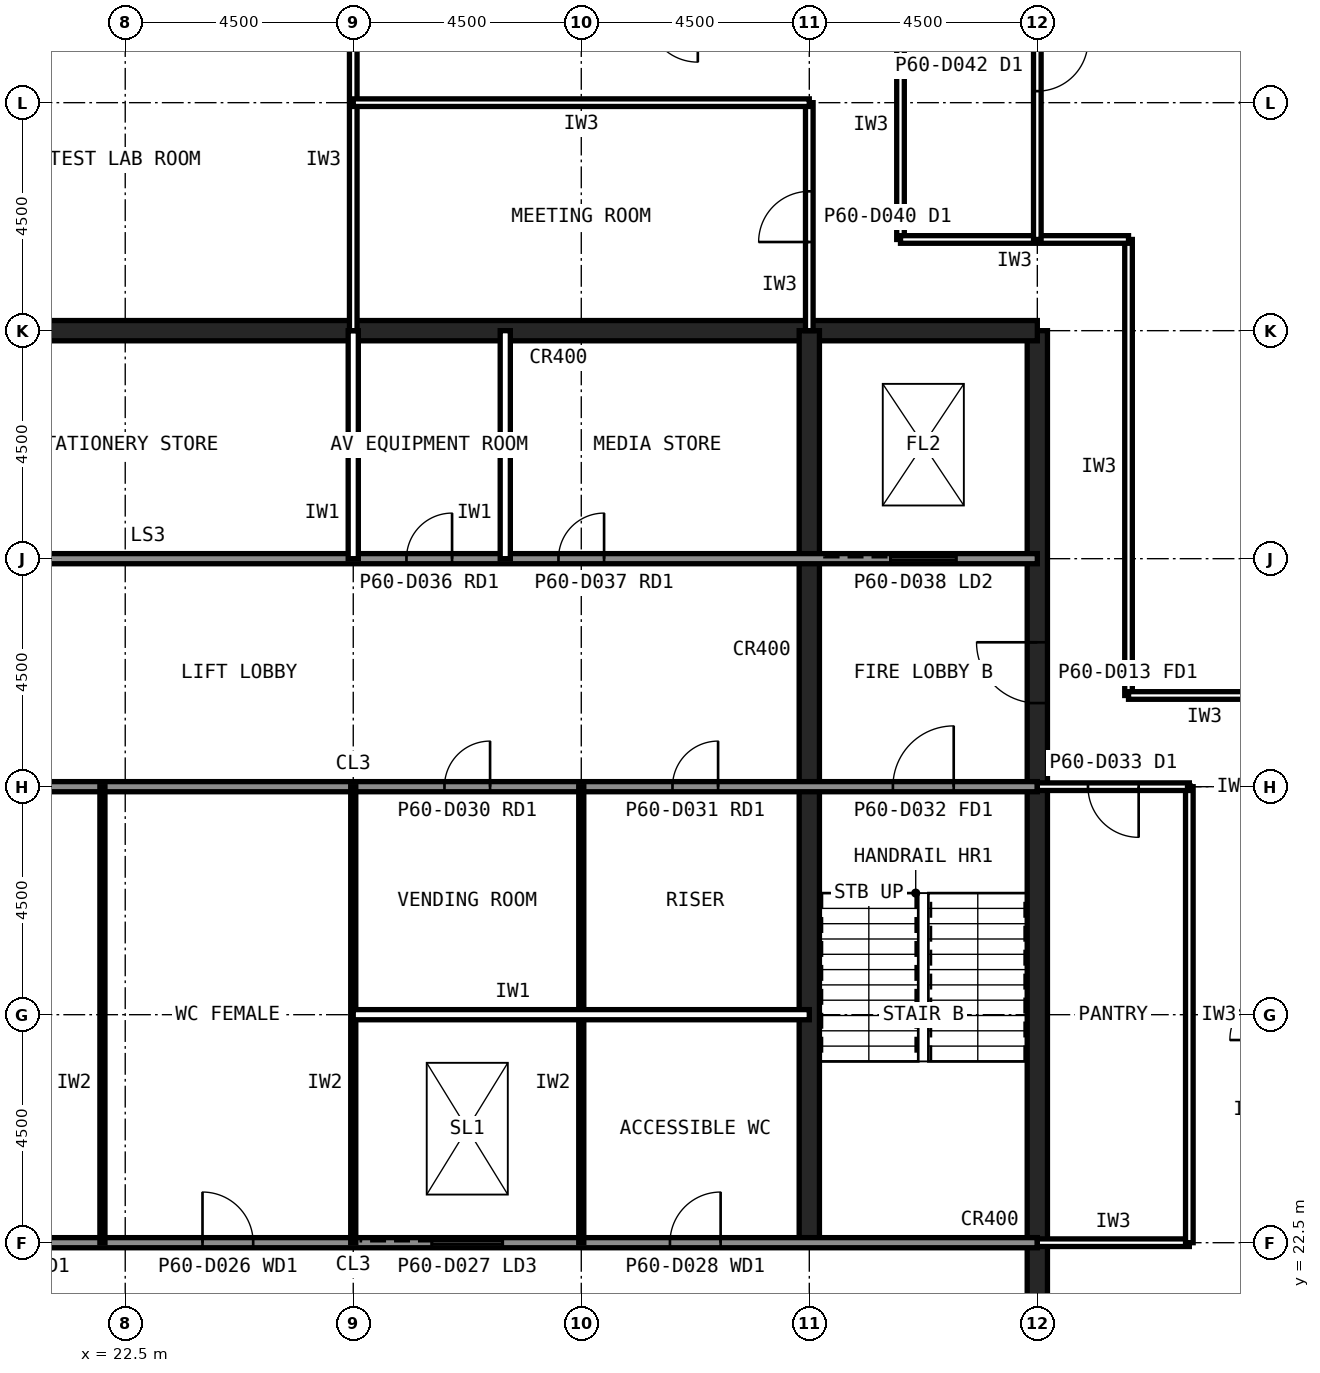
"""IFC4 building model, lengths in metres.
Left out: names, types, materials, properties, quantities, classifications, styles, units other than length and angle.
Written with IfcOpenShell. Run it as: python <this file> out.ifc"""

import sys

from ifc_helpers import new_model, si_unit, direction, frame, frame_2d, origin, place, context, subcontext, project, spatial, rectangle, extrude, element, fill, save


model = new_model("IFC4")
c1 = context("Model", 3, precision=1e-05, world=origin(), true_north=direction((0.0, 1.0)))
c2 = subcontext(c1, "Body", "Model", "MODEL_VIEW")
j1 = project(units=[si_unit("LENGTHUNIT", "METRE"), si_unit("PLANEANGLEUNIT", "RADIAN")], contexts=[c1])
p1 = place(None, origin())
s1 = spatial("IfcSite", under=j1, at=p1, CompositionType="ELEMENT")
p2 = place(p1, origin())
s2 = spatial("IfcBuilding", under=s1, at=p2, CompositionType="ELEMENT")
p3 = place(p2, frame((0.0, 0.0, 254.6)))
s3 = spatial("IfcBuildingStorey", under=s2, at=p3, CompositionType="ELEMENT", Elevation=254.6)
p4 = place(p3, frame((40.5, 13.5, 0.0), z_axis=(0.0, 0.0, 1.0), x_axis=(0.0, 1.0, 0.0)))
e1 = element("IfcWall", 1, at=p4, inside=s3, PredefinedType="SHEAR", context=c2, shape_type="SweptSolid", body=[
    extrude(rectangle(XDim=27.0, YDim=0.4, at=frame_2d((13.5, 0.0))), origin(), (0.0, 0.0, 1.0), 4.0),
])
p5 = place(p4, frame((5.85, 0.0, 0.0)))
e2 = element("IfcOpeningElement", 2, at=p5, cuts=e1, PredefinedType="OPENING", context=c2, shape_type="SweptSolid", body=[
    extrude(rectangle(XDim=1.8, YDim=2.1, at=frame_2d((0.9, 1.05))), frame((0.0, 0.21, 0.0), z_axis=(0.0, -1.0, 0.0), x_axis=(1.0, 0.0, 0.0)), (0.0, 0.0, 1.0), 0.42),
])
p6 = place(p4, frame((19.65, 0.0, 0.0)))
e3 = element("IfcOpeningElement", 3, at=p6, cuts=e1, PredefinedType="OPENING", context=c2, shape_type="SweptSolid", body=[
    extrude(rectangle(XDim=1.2, YDim=2.1, at=frame_2d((0.6, 1.05))), frame((0.0, 0.21, 0.0), z_axis=(0.0, -1.0, 0.0), x_axis=(1.0, 0.0, 0.0)), (0.0, 0.0, 1.0), 0.42),
])
p7 = place(p3, frame((40.5, 40.5, 0.0), z_axis=(0.0, 0.0, 1.0), x_axis=(-1.0, 0.0, 0.0)))
e4 = element("IfcWall", 4, at=p7, inside=s3, PredefinedType="SHEAR", context=c2, shape_type="SweptSolid", body=[
    extrude(rectangle(XDim=27.0, YDim=0.4, at=frame_2d((13.5, 0.0))), origin(), (0.0, 0.0, 1.0), 4.0),
])
p8 = place(p3, frame((36.0, 22.5, 0.0), z_axis=(0.0, 0.0, 1.0), x_axis=(0.0, 1.0, 0.0)))
e5 = element("IfcWall", 5, at=p8, inside=s3, PredefinedType="SHEAR", context=c2, shape_type="SweptSolid", body=[
    extrude(rectangle(XDim=18.0, YDim=0.4, at=frame_2d((9.0, 0.0))), origin(), (0.0, 0.0, 1.0), 4.0),
])
p9 = place(p3, frame((13.5, 36.0, 0.0), z_axis=(0.0, 0.0, 1.0), x_axis=(1.0, 0.0, 0.0)))
e6 = element("IfcWall", 6, at=p9, inside=s3, PredefinedType="SOLIDWALL", context=c2, shape_type="SweptSolid", body=[
    extrude(rectangle(XDim=27.0, YDim=0.2, at=frame_2d((13.5, 0.0))), origin(), (0.0, 0.0, 1.0), 3.84),
])
p10 = place(p9, frame((1.8, 0.0, 0.0)))
e7 = element("IfcOpeningElement", 7, at=p10, cuts=e6, PredefinedType="OPENING", context=c2, shape_type="SweptSolid", body=[
    extrude(rectangle(XDim=0.9, YDim=2.1, at=frame_2d((0.45, 1.05))), frame((0.0, 0.11, 0.0), z_axis=(0.0, -1.0, 0.0), x_axis=(1.0, 0.0, 0.0)), (0.0, 0.0, 1.0), 0.22),
])
p11 = place(p9, frame((5.55, 0.0, 0.0)))
e8 = element("IfcOpeningElement", 8, at=p11, cuts=e6, PredefinedType="OPENING", context=c2, shape_type="SweptSolid", body=[
    extrude(rectangle(XDim=0.9, YDim=2.1, at=frame_2d((0.45, 1.05))), frame((0.0, 0.11, 0.0), z_axis=(0.0, -1.0, 0.0), x_axis=(1.0, 0.0, 0.0)), (0.0, 0.0, 1.0), 0.22),
])
p12 = place(p9, frame((14.55, 0.0, 0.0)))
e9 = element("IfcOpeningElement", 9, at=p12, cuts=e6, PredefinedType="OPENING", context=c2, shape_type="SweptSolid", body=[
    extrude(rectangle(XDim=0.9, YDim=2.1, at=frame_2d((0.45, 1.05))), frame((0.0, 0.11, 0.0), z_axis=(0.0, -1.0, 0.0), x_axis=(1.0, 0.0, 0.0)), (0.0, 0.0, 1.0), 0.22),
])
p13 = place(p9, frame((17.55, 0.0, 0.0)))
e10 = element("IfcOpeningElement", 10, at=p13, cuts=e6, PredefinedType="OPENING", context=c2, shape_type="SweptSolid", body=[
    extrude(rectangle(XDim=0.9, YDim=2.1, at=frame_2d((0.45, 1.05))), frame((0.0, 0.11, 0.0), z_axis=(0.0, -1.0, 0.0), x_axis=(1.0, 0.0, 0.0)), (0.0, 0.0, 1.0), 0.22),
])
p14 = place(p9, frame((24.1, 0.0, 0.0)))
e11 = element("IfcOpeningElement", 11, at=p14, cuts=e6, PredefinedType="OPENING", context=c2, shape_type="SweptSolid", body=[
    extrude(rectangle(XDim=1.3, YDim=2.2, at=frame_2d((0.65, 1.1))), frame((0.0, 0.11, 0.0), z_axis=(0.0, -1.0, 0.0), x_axis=(1.0, 0.0, 0.0)), (0.0, 0.0, 1.0), 0.22),
])
p15 = place(p3, frame((13.5, 22.5, 0.0), z_axis=(0.0, 0.0, 1.0), x_axis=(1.0, 0.0, 0.0)))
e12 = element("IfcWall", 12, at=p15, inside=s3, PredefinedType="SOLIDWALL", context=c2, shape_type="SweptSolid", body=[
    extrude(rectangle(XDim=27.0, YDim=0.2, at=frame_2d((13.5, 0.0))), origin(), (0.0, 0.0, 1.0), 3.84),
])
p16 = place(p15, frame((1.65, 0.0, 0.0)))
e13 = element("IfcOpeningElement", 13, at=p16, cuts=e12, PredefinedType="OPENING", context=c2, shape_type="SweptSolid", body=[
    extrude(rectangle(XDim=1.2, YDim=2.1, at=frame_2d((0.6, 1.05))), frame((0.0, 0.11, 0.0), z_axis=(0.0, -1.0, 0.0), x_axis=(1.0, 0.0, 0.0)), (0.0, 0.0, 1.0), 0.22),
])
p17 = place(p15, frame((6.025, 0.0, 0.0)))
e14 = element("IfcOpeningElement", 14, at=p17, cuts=e12, PredefinedType="OPENING", context=c2, shape_type="SweptSolid", body=[
    extrude(rectangle(XDim=1.0, YDim=2.1, at=frame_2d((0.5, 1.05))), frame((0.0, 0.11, 0.0), z_axis=(0.0, -1.0, 0.0), x_axis=(1.0, 0.0, 0.0)), (0.0, 0.0, 1.0), 0.22),
])
p18 = place(p15, frame((10.525, 0.0, 0.0)))
e15 = element("IfcOpeningElement", 15, at=p18, cuts=e12, PredefinedType="OPENING", context=c2, shape_type="SweptSolid", body=[
    extrude(rectangle(XDim=1.0, YDim=2.1, at=frame_2d((0.5, 1.05))), frame((0.0, 0.11, 0.0), z_axis=(0.0, -1.0, 0.0), x_axis=(1.0, 0.0, 0.0)), (0.0, 0.0, 1.0), 0.22),
])
p19 = place(p15, frame((19.75, 0.0, 0.0)))
e16 = element("IfcOpeningElement", 16, at=p19, cuts=e12, PredefinedType="OPENING", context=c2, shape_type="SweptSolid", body=[
    extrude(rectangle(XDim=1.0, YDim=2.1, at=frame_2d((0.5, 1.05))), frame((0.0, 0.11, 0.0), z_axis=(0.0, -1.0, 0.0), x_axis=(1.0, 0.0, 0.0)), (0.0, 0.0, 1.0), 0.22),
])
p20 = place(p15, frame((15.05, 0.0, 0.0)))
e17 = element("IfcOpeningElement", 17, at=p20, cuts=e12, PredefinedType="OPENING", context=c2, shape_type="SweptSolid", body=[
    extrude(rectangle(XDim=1.4, YDim=2.4, at=frame_2d((0.7, 1.2))), frame((0.0, 0.11, 0.0), z_axis=(0.0, -1.0, 0.0), x_axis=(1.0, 0.0, 0.0)), (0.0, 0.0, 1.0), 0.22),
])
p21 = place(p3, frame((13.5, 31.5, 0.0), z_axis=(0.0, 0.0, 1.0), x_axis=(1.0, 0.0, 0.0)))
e18 = element("IfcWall", 18, at=p21, inside=s3, PredefinedType="SOLIDWALL", context=c2, shape_type="SweptSolid", body=[
    extrude(rectangle(XDim=27.0, YDim=0.2, at=frame_2d((13.5, 0.0))), origin(), (0.0, 0.0, 1.0), 3.84),
])
p22 = place(p21, frame((24.15, 0.0, 0.0)))
e19 = element("IfcOpeningElement", 19, at=p22, cuts=e18, PredefinedType="OPENING", context=c2, shape_type="SweptSolid", body=[
    extrude(rectangle(XDim=1.2, YDim=2.1, at=frame_2d((0.6, 1.05))), frame((0.0, 0.11, 0.0), z_axis=(0.0, -1.0, 0.0), x_axis=(1.0, 0.0, 0.0)), (0.0, 0.0, 1.0), 0.22),
])
p23 = place(p21, frame((15.3, 0.0, 0.0)))
e20 = element("IfcOpeningElement", 20, at=p23, cuts=e18, PredefinedType="OPENING", context=c2, shape_type="SweptSolid", body=[
    extrude(rectangle(XDim=0.9, YDim=2.1, at=frame_2d((0.45, 1.05))), frame((0.0, 0.11, 0.0), z_axis=(0.0, -1.0, 0.0), x_axis=(1.0, 0.0, 0.0)), (0.0, 0.0, 1.0), 0.22),
])
p24 = place(p21, frame((19.8, 0.0, 0.0)))
e21 = element("IfcOpeningElement", 21, at=p24, cuts=e18, PredefinedType="OPENING", context=c2, shape_type="SweptSolid", body=[
    extrude(rectangle(XDim=0.9, YDim=2.1, at=frame_2d((0.45, 1.05))), frame((0.0, 0.11, 0.0), z_axis=(0.0, -1.0, 0.0), x_axis=(1.0, 0.0, 0.0)), (0.0, 0.0, 1.0), 0.22),
])
for number, where, z_axis, x_axis in (
    (22, (27.0, 36.0, 0.0), (0.0, 0.0, 1.0), (0.0, 1.0, 0.0)),
    (23, (30.0, 36.0, 0.0), (0.0, 0.0, 1.0), (0.0, 1.0, 0.0)),
):
    element("IfcWall", number, at=place(p3, frame(where, z_axis=z_axis, x_axis=x_axis)), inside=s3, PredefinedType="PARTITIONING", context=c2, shape_type="SweptSolid", body=[
        extrude(rectangle(XDim=4.5, YDim=0.2, at=frame_2d((2.25, 0.0))), origin(), (0.0, 0.0, 1.0), 3.84),
    ])
for number, where, z_axis, x_axis in (
    (24, (22.05, 22.5, 0.0), (0.0, 0.0, 1.0), (0.0, 1.0, 0.0)),
    (25, (27.0, 22.5, 0.0), (0.0, 0.0, 1.0), (0.0, 1.0, 0.0)),
    (26, (31.5, 22.5, 0.0), (0.0, 0.0, 1.0), (0.0, 1.0, 0.0)),
):
    element("IfcWall", number, at=place(p3, frame(where, z_axis=z_axis, x_axis=x_axis)), inside=s3, PredefinedType="PLUMBINGWALL", context=c2, shape_type="SweptSolid", body=[
        extrude(rectangle(XDim=9.0, YDim=0.1, at=frame_2d((4.5, 0.0))), origin(), (0.0, 0.0, 1.0), 3.84),
    ])
p25 = place(p3, frame((27.0, 27.0, 0.0), z_axis=(0.0, 0.0, 1.0), x_axis=(1.0, 0.0, 0.0)))
e27 = element("IfcWall", 27, at=p25, inside=s3, PredefinedType="PARTITIONING", context=c2, shape_type="SweptSolid", body=[
    extrude(rectangle(XDim=9.0, YDim=0.2, at=frame_2d((4.5, 0.0))), origin(), (0.0, 0.0, 1.0), 3.84),
])
p26 = place(p3, frame((42.3, 33.3, 0.0), z_axis=(0.0, 0.0, 1.0), x_axis=(0.0, 1.0, 0.0)))
e28 = element("IfcWall", 28, at=p26, inside=s3, PredefinedType="PARTITIONING", context=c2, shape_type="SweptSolid", body=[
    extrude(rectangle(XDim=9.0, YDim=0.15, at=frame_2d((4.5, 0.0))), origin(), (0.0, 0.0, 1.0), 3.84),
])
for number, where, z_axis, x_axis in (
    (29, (37.8, 42.3, 0.0), (0.0, 0.0, 1.0), (0.0, 1.0, 0.0)),
    (30, (42.3, 42.3, 0.0), (0.0, 0.0, 1.0), (-1.0, 0.0, 0.0)),
):
    element("IfcWall", number, at=place(p3, frame(where, z_axis=z_axis, x_axis=x_axis)), inside=s3, PredefinedType="PARTITIONING", context=c2, shape_type="SweptSolid", body=[
        extrude(rectangle(XDim=4.5, YDim=0.15, at=frame_2d((2.25, 0.0))), origin(), (0.0, 0.0, 1.0), 3.84),
    ])
p27 = place(p3, frame((45.3, 33.3, 0.0), z_axis=(0.0, 0.0, 1.0), x_axis=(-1.0, 0.0, 0.0)))
e31 = element("IfcWall", 31, at=p27, inside=s3, PredefinedType="PARTITIONING", context=c2, shape_type="SweptSolid", body=[
    extrude(rectangle(XDim=3.0, YDim=0.15, at=frame_2d((1.5, 0.0))), origin(), (0.0, 0.0, 1.0), 3.84),
])
p28 = place(p3, frame((27.0, 40.5, 0.0), z_axis=(0.0, 0.0, 1.0), x_axis=(0.0, 1.0, 0.0)))
e32 = element("IfcWall", 32, at=p28, inside=s3, PredefinedType="PARTITIONING", context=c2, shape_type="SweptSolid", body=[
    extrude(rectangle(XDim=6.75, YDim=0.15, at=frame_2d((3.375, 0.0))), origin(), (0.0, 0.0, 1.0), 2.989),
])
p29 = place(p3, frame((36.0, 40.5, 0.0), z_axis=(0.0, 0.0, 1.0), x_axis=(0.0, 1.0, 0.0)))
e33 = element("IfcWall", 33, at=p29, inside=s3, PredefinedType="PARTITIONING", context=c2, shape_type="SweptSolid", body=[
    extrude(rectangle(XDim=4.5, YDim=0.15, at=frame_2d((2.25, 0.0))), origin(), (0.0, 0.0, 1.0), 2.989),
])
p30 = place(p29, frame((1.75, 0.0, 0.0)))
e34 = element("IfcOpeningElement", 34, at=p30, cuts=e33, PredefinedType="OPENING", context=c2, shape_type="SweptSolid", body=[
    extrude(rectangle(XDim=1.0, YDim=2.1, at=frame_2d((0.5, 1.05))), frame((0.0, 0.085, 0.0), z_axis=(0.0, -1.0, 0.0), x_axis=(1.0, 0.0, 0.0)), (0.0, 0.0, 1.0), 0.17),
])
p31 = place(p3, frame((36.0, 45.0, 0.0), z_axis=(0.0, 0.0, 1.0), x_axis=(-1.0, 0.0, 0.0)))
e35 = element("IfcWall", 35, at=p31, inside=s3, PredefinedType="PARTITIONING", context=c2, shape_type="SweptSolid", body=[
    extrude(rectangle(XDim=9.0, YDim=0.15, at=frame_2d((4.5, 0.0))), origin(), (0.0, 0.0, 1.0), 3.84),
])
p32 = place(p3, frame((40.5, 22.5, 0.0), z_axis=(0.0, 0.0, 1.0), x_axis=(1.0, 0.0, 0.0)))
e36 = element("IfcWall", 36, at=p32, inside=s3, PredefinedType="PARTITIONING", context=c2, shape_type="SweptSolid", body=[
    extrude(rectangle(XDim=3.0, YDim=0.15, at=frame_2d((1.5, 0.0))), origin(), (0.0, 0.0, 1.0), 2.989),
])
p33 = place(p3, frame((43.5, 22.5, 0.0), z_axis=(0.0, 0.0, 1.0), x_axis=(0.0, 1.0, 0.0)))
e37 = element("IfcWall", 37, at=p33, inside=s3, PredefinedType="PARTITIONING", context=c2, shape_type="SweptSolid", body=[
    extrude(rectangle(XDim=9.0, YDim=0.15, at=frame_2d((4.5, 0.0))), origin(), (0.0, 0.0, 1.0), 3.84),
])
p34 = place(p3, frame((43.5, 31.5, 0.0), z_axis=(0.0, 0.0, 1.0), x_axis=(-1.0, 0.0, 0.0)))
e38 = element("IfcWall", 38, at=p34, inside=s3, PredefinedType="PARTITIONING", context=c2, shape_type="SweptSolid", body=[
    extrude(rectangle(XDim=3.0, YDim=0.15, at=frame_2d((1.5, 0.0))), origin(), (0.0, 0.0, 1.0), 2.989),
])
p35 = place(p34, frame((1.0, 0.0, 0.0)))
e39 = element("IfcOpeningElement", 39, at=p35, cuts=e38, PredefinedType="OPENING", context=c2, shape_type="SweptSolid", body=[
    extrude(rectangle(XDim=1.0, YDim=2.1, at=frame_2d((0.5, 1.05))), frame((0.0, 0.085, 0.0), z_axis=(0.0, -1.0, 0.0), x_axis=(1.0, 0.0, 0.0)), (0.0, 0.0, 1.0), 0.17),
])
p36 = place(p3, frame((40.5, 49.155, 0.0), z_axis=(0.0, 0.0, 1.0), x_axis=(0.0, -1.0, 0.0)))
e40 = element("IfcWall", 40, at=p36, inside=s3, PredefinedType="PARTITIONING", context=c2, shape_type="SweptSolid", body=[
    extrude(rectangle(XDim=6.855, YDim=0.15, at=frame_2d((3.427, 0.0))), origin(), (0.0, 0.0, 1.0), 2.989),
])
p37 = place(p36, frame((2.927, 0.0, 0.0)))
e41 = element("IfcOpeningElement", 41, at=p37, cuts=e40, PredefinedType="OPENING", context=c2, shape_type="SweptSolid", body=[
    extrude(rectangle(XDim=1.0, YDim=2.1, at=frame_2d((0.5, 1.05))), frame((0.0, 0.085, 0.0), z_axis=(0.0, -1.0, 0.0), x_axis=(1.0, 0.0, 0.0)), (0.0, 0.0, 1.0), 0.17),
])
p38 = place(p6, origin())
e42 = element("IfcDoor", 42, at=p38, inside=s3, OperationType="SINGLE_SWING_RIGHT", PredefinedType="DOOR", context=c2, shape_type="SweptSolid", body=[
    extrude(rectangle(XDim=1.2, YDim=2.1, at=frame_2d((0.6, 1.05))), frame((0.0, 0.025, 0.0), z_axis=(0.0, -1.0, 0.0), x_axis=(1.0, 0.0, 0.0)), (0.0, 0.0, 1.0), 0.05),
])
fill(e3, e42)
p39 = place(p22, origin())
e43 = element("IfcDoor", 43, at=p39, inside=s3, OperationType="SINGLE_SWING_RIGHT", PredefinedType="DOOR", context=c2, shape_type="SweptSolid", body=[
    extrude(rectangle(XDim=1.2, YDim=2.1, at=frame_2d((0.6, 1.05))), frame((0.0, 0.025, 0.0), z_axis=(0.0, -1.0, 0.0), x_axis=(1.0, 0.0, 0.0)), (0.0, 0.0, 1.0), 0.05),
])
fill(e19, e43)
p40 = place(p18, origin())
e44 = element("IfcDoor", 44, at=p40, inside=s3, OperationType="SINGLE_SWING_LEFT", PredefinedType="DOOR", context=c2, shape_type="SweptSolid", body=[
    extrude(rectangle(XDim=1.0, YDim=2.1, at=frame_2d((0.5, 1.05))), frame((0.0, 0.025, 0.0), z_axis=(0.0, -1.0, 0.0), x_axis=(1.0, 0.0, 0.0)), (0.0, 0.0, 1.0), 0.05),
])
fill(e15, e44)
p41 = place(p19, origin())
e45 = element("IfcDoor", 45, at=p41, inside=s3, OperationType="SINGLE_SWING_RIGHT", PredefinedType="DOOR", context=c2, shape_type="SweptSolid", body=[
    extrude(rectangle(XDim=1.0, YDim=2.1, at=frame_2d((0.5, 1.05))), frame((0.0, 0.025, 0.0), z_axis=(0.0, -1.0, 0.0), x_axis=(1.0, 0.0, 0.0)), (0.0, 0.0, 1.0), 0.05),
])
fill(e16, e45)
p42 = place(p23, origin())
e46 = element("IfcDoor", 46, at=p42, inside=s3, OperationType="SINGLE_SWING_RIGHT", PredefinedType="DOOR", context=c2, shape_type="SweptSolid", body=[
    extrude(rectangle(XDim=0.9, YDim=2.1, at=frame_2d((0.45, 1.05))), frame((0.0, 0.025, 0.0), z_axis=(0.0, -1.0, 0.0), x_axis=(1.0, 0.0, 0.0)), (0.0, 0.0, 1.0), 0.05),
])
fill(e20, e46)
p43 = place(p24, origin())
e47 = element("IfcDoor", 47, at=p43, inside=s3, OperationType="SINGLE_SWING_RIGHT", PredefinedType="DOOR", context=c2, shape_type="SweptSolid", body=[
    extrude(rectangle(XDim=0.9, YDim=2.1, at=frame_2d((0.45, 1.05))), frame((0.0, 0.025, 0.0), z_axis=(0.0, -1.0, 0.0), x_axis=(1.0, 0.0, 0.0)), (0.0, 0.0, 1.0), 0.05),
])
fill(e21, e47)
p44 = place(p12, origin())
e48 = element("IfcDoor", 48, at=p44, inside=s3, OperationType="SINGLE_SWING_RIGHT", PredefinedType="DOOR", context=c2, shape_type="SweptSolid", body=[
    extrude(rectangle(XDim=0.9, YDim=2.1, at=frame_2d((0.45, 1.05))), frame((0.0, 0.025, 0.0), z_axis=(0.0, -1.0, 0.0), x_axis=(1.0, 0.0, 0.0)), (0.0, 0.0, 1.0), 0.05),
])
fill(e9, e48)
p45 = place(p13, origin())
e49 = element("IfcDoor", 49, at=p45, inside=s3, OperationType="SINGLE_SWING_RIGHT", PredefinedType="DOOR", context=c2, shape_type="SweptSolid", body=[
    extrude(rectangle(XDim=0.9, YDim=2.1, at=frame_2d((0.45, 1.05))), frame((0.0, 0.025, 0.0), z_axis=(0.0, -1.0, 0.0), x_axis=(1.0, 0.0, 0.0)), (0.0, 0.0, 1.0), 0.05),
])
fill(e10, e49)
p46 = place(p14, origin())
e50 = element("IfcDoor", 50, at=p46, inside=s3, OperationType="SLIDING_TO_LEFT", PredefinedType="DOOR", context=c2, shape_type="SweptSolid", body=[
    extrude(rectangle(XDim=1.3, YDim=2.2, at=frame_2d((0.65, 1.1))), frame((0.0, 0.025, 0.0), z_axis=(0.0, -1.0, 0.0), x_axis=(1.0, 0.0, 0.0)), (0.0, 0.0, 1.0), 0.05),
])
fill(e11, e50)
p47 = place(p20, origin())
e51 = element("IfcDoor", 51, at=p47, inside=s3, OperationType="SLIDING_TO_LEFT", PredefinedType="DOOR", context=c2, shape_type="SweptSolid", body=[
    extrude(rectangle(XDim=1.4, YDim=2.4, at=frame_2d((0.7, 1.2))), frame((0.0, 0.025, 0.0), z_axis=(0.0, -1.0, 0.0), x_axis=(1.0, 0.0, 0.0)), (0.0, 0.0, 1.0), 0.05),
])
fill(e17, e51)
p48 = place(p30, origin())
e52 = element("IfcDoor", 52, at=p48, inside=s3, OperationType="SINGLE_SWING_LEFT", PredefinedType="DOOR", context=c2, shape_type="SweptSolid", body=[
    extrude(rectangle(XDim=1.0, YDim=2.1, at=frame_2d((0.5, 1.05))), frame((0.0, 0.025, 0.0), z_axis=(0.0, -1.0, 0.0), x_axis=(1.0, 0.0, 0.0)), (0.0, 0.0, 1.0), 0.05),
])
fill(e34, e52)
p49 = place(p35, origin())
e53 = element("IfcDoor", 53, at=p49, inside=s3, OperationType="SINGLE_SWING_LEFT", PredefinedType="DOOR", context=c2, shape_type="SweptSolid", body=[
    extrude(rectangle(XDim=1.0, YDim=2.1, at=frame_2d((0.5, 1.05))), frame((0.0, 0.025, 0.0), z_axis=(0.0, -1.0, 0.0), x_axis=(1.0, 0.0, 0.0)), (0.0, 0.0, 1.0), 0.05),
])
fill(e39, e53)
p50 = place(p37, origin())
e54 = element("IfcDoor", 54, at=p50, inside=s3, OperationType="SINGLE_SWING_LEFT", PredefinedType="DOOR", context=c2, shape_type="SweptSolid", body=[
    extrude(rectangle(XDim=1.0, YDim=2.1, at=frame_2d((0.5, 1.05))), frame((0.0, 0.025, 0.0), z_axis=(0.0, -1.0, 0.0), x_axis=(1.0, 0.0, 0.0)), (0.0, 0.0, 1.0), 0.05),
])
fill(e41, e54)
save(model, sys.argv[1])
